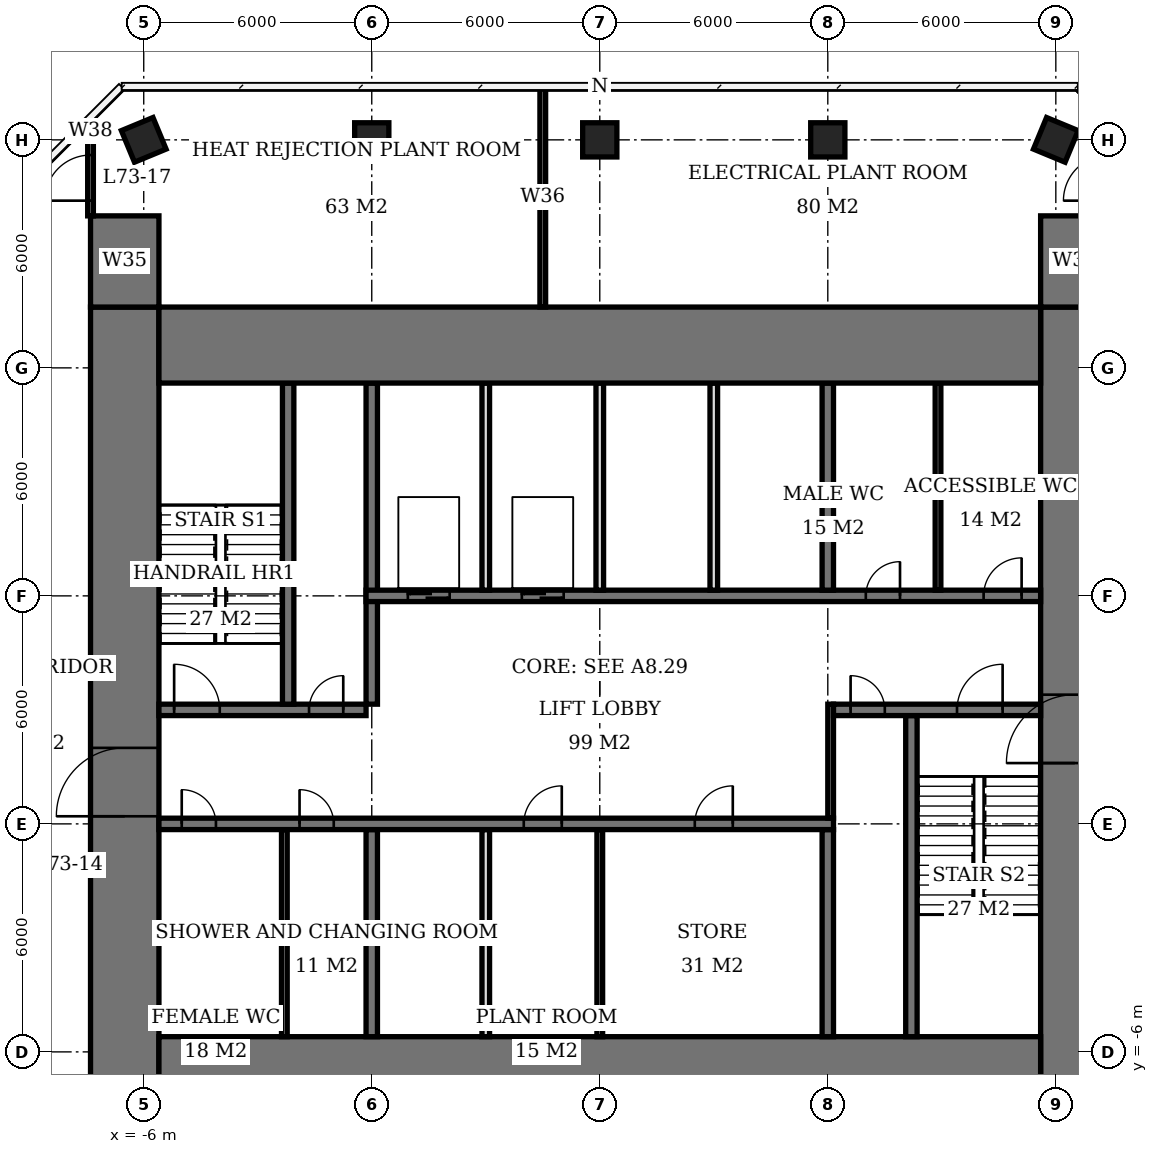
"""IFC4 building model, lengths in metres.
Left out: names, types, materials, properties, quantities, classifications, styles, units other than length and angle.
Written with IfcOpenShell. Run it as: python <this file> out.ifc"""

import sys

from ifc_helpers import new_model, si_unit, direction, frame, frame_2d, origin, origin_2d, place, context, subcontext, project, spatial, rectangle, extrude, element, fill, save


model = new_model("IFC4")
c1 = context("Model", 3, precision=1e-05, world=origin(), true_north=direction((0.0, 1.0)))
c2 = subcontext(c1, "Body", "Model", "MODEL_VIEW")
j1 = project(units=[si_unit("LENGTHUNIT", "METRE"), si_unit("PLANEANGLEUNIT", "RADIAN")], contexts=[c1])
p1 = place(None, origin())
s1 = spatial("IfcSite", under=j1, at=p1, CompositionType="ELEMENT")
p2 = place(p1, origin())
s2 = spatial("IfcBuilding", under=s1, at=p2, CompositionType="ELEMENT")
p3 = place(p2, frame((0.0, 0.0, 295.7)))
s3 = spatial("IfcBuildingStorey", under=s2, at=p3, CompositionType="ELEMENT", Elevation=295.7)
for number, where, z_axis, x_axis in (
    (1, (-6.0, 18.0, 0.0), (0.0, 0.0, 1.0), (0.924, 0.383, 0.0)),
    (2, (0.0, 18.0, 0.0), (0.0, 0.0, 1.0), (1.0, 0.0, 0.0)),
    (3, (6.0, 18.0, 0.0), (0.0, 0.0, 1.0), (1.0, 0.0, 0.0)),
    (4, (12.0, 18.0, 0.0), (0.0, 0.0, 1.0), (1.0, 0.0, 0.0)),
    (5, (18.0, 18.0, 0.0), (0.0, 0.0, 1.0), (0.924, -0.383, 0.0)),
):
    element("IfcColumn", number, at=place(p3, frame(where, z_axis=z_axis, x_axis=x_axis)), inside=s3, PredefinedType="COLUMN", context=c2, shape_type="SweptSolid", body=[
        extrude(rectangle(XDim=0.9, YDim=0.9, at=origin_2d()), origin(), (0.0, 0.0, 1.0), 5.0),
    ])
for number, where, z_axis, x_axis in (
    (6, (-5.6, -6.6, 0.0), (0.0, 0.0, 1.0), (1.0, 0.0, 0.0)),
    (7, (-5.6, 12.6, 0.0), (0.0, 0.0, 1.0), (1.0, 0.0, 0.0)),
):
    element("IfcWall", number, at=place(p3, frame(where, z_axis=z_axis, x_axis=x_axis)), inside=s3, PredefinedType="SHEAR", context=c2, shape_type="SweptSolid", body=[
        extrude(rectangle(XDim=23.2, YDim=2.0, at=frame_2d((11.6, 0.0))), origin(), (0.0, 0.0, 1.0), 5.0),
    ])
p4 = place(p3, frame((-6.5, -7.6, 0.0), z_axis=(0.0, 0.0, 1.0), x_axis=(0.0, 1.0, 0.0)))
e8 = element("IfcWall", 8, at=p4, inside=s3, PredefinedType="SHEAR", context=c2, shape_type="SweptSolid", body=[
    extrude(rectangle(XDim=21.2, YDim=1.8, at=frame_2d((10.6, 0.0))), origin(), (0.0, 0.0, 1.0), 5.0),
])
p5 = place(p4, frame((7.8, 0.0, 0.0)))
e9 = element("IfcOpeningElement", 9, at=p5, cuts=e8, PredefinedType="OPENING", context=c2, shape_type="SweptSolid", body=[
    extrude(rectangle(XDim=1.8, YDim=2.4, at=frame_2d((0.9, 1.2))), frame((0.0, 0.91, 0.0), z_axis=(0.0, -1.0, 0.0), x_axis=(1.0, 0.0, 0.0)), (0.0, 0.0, 1.0), 1.82),
])
p6 = place(p3, frame((18.5, -7.6, 0.0), z_axis=(0.0, 0.0, 1.0), x_axis=(0.0, 1.0, 0.0)))
e10 = element("IfcWall", 10, at=p6, inside=s3, PredefinedType="SHEAR", context=c2, shape_type="SweptSolid", body=[
    extrude(rectangle(XDim=21.2, YDim=1.8, at=frame_2d((10.6, 0.0))), origin(), (0.0, 0.0, 1.0), 5.0),
])
p7 = place(p6, frame((9.2, 0.0, 0.0)))
e11 = element("IfcOpeningElement", 11, at=p7, cuts=e10, PredefinedType="OPENING", context=c2, shape_type="SweptSolid", body=[
    extrude(rectangle(XDim=1.8, YDim=2.4, at=frame_2d((0.9, 1.2))), frame((0.0, 0.91, 0.0), z_axis=(0.0, -1.0, 0.0), x_axis=(1.0, 0.0, 0.0)), (0.0, 0.0, 1.0), 1.82),
])
for number, where, z_axis, x_axis in (
    (12, (-6.5, 13.6, 0.0), (0.0, 0.0, 1.0), (0.0, 1.0, 0.0)),
    (13, (18.5, 13.6, 0.0), (0.0, 0.0, 1.0), (0.0, 1.0, 0.0)),
):
    element("IfcWall", number, at=place(p3, frame(where, z_axis=z_axis, x_axis=x_axis)), inside=s3, PredefinedType="SHEAR", context=c2, shape_type="SweptSolid", body=[
        extrude(rectangle(XDim=2.4, YDim=1.8, at=frame_2d((1.2, 0.0))), origin(), (0.0, 0.0, 1.0), 5.0),
    ])
p8 = place(p3, frame((-5.6, 0.0, 0.0), z_axis=(0.0, 0.0, 1.0), x_axis=(1.0, 0.0, 0.0)))
e14 = element("IfcWall", 14, at=p8, inside=s3, PredefinedType="SHEAR", context=c2, shape_type="SweptSolid", body=[
    extrude(rectangle(XDim=17.75, YDim=0.3, at=frame_2d((8.875, 0.0))), origin(), (0.0, 0.0, 1.0), 5.0),
])
p9 = place(p8, frame((0.6, 0.0, 0.0)))
e15 = element("IfcOpeningElement", 15, at=p9, cuts=e14, PredefinedType="OPENING", context=c2, shape_type="SweptSolid", body=[
    extrude(rectangle(XDim=0.9, YDim=2.1, at=frame_2d((0.45, 1.05))), frame((0.0, 0.16, 0.0), z_axis=(0.0, -1.0, 0.0), x_axis=(1.0, 0.0, 0.0)), (0.0, 0.0, 1.0), 0.32),
])
p10 = place(p8, frame((3.7, 0.0, 0.0)))
e16 = element("IfcOpeningElement", 16, at=p10, cuts=e14, PredefinedType="OPENING", context=c2, shape_type="SweptSolid", body=[
    extrude(rectangle(XDim=0.9, YDim=2.1, at=frame_2d((0.45, 1.05))), frame((0.0, 0.16, 0.0), z_axis=(0.0, -1.0, 0.0), x_axis=(1.0, 0.0, 0.0)), (0.0, 0.0, 1.0), 0.32),
])
p11 = place(p8, frame((9.6, 0.0, 0.0)))
e17 = element("IfcOpeningElement", 17, at=p11, cuts=e14, PredefinedType="OPENING", context=c2, shape_type="SweptSolid", body=[
    extrude(rectangle(XDim=1.0, YDim=2.1, at=frame_2d((0.5, 1.05))), frame((0.0, 0.16, 0.0), z_axis=(0.0, -1.0, 0.0), x_axis=(1.0, 0.0, 0.0)), (0.0, 0.0, 1.0), 0.32),
])
p12 = place(p8, frame((14.1, 0.0, 0.0)))
e18 = element("IfcOpeningElement", 18, at=p12, cuts=e14, PredefinedType="OPENING", context=c2, shape_type="SweptSolid", body=[
    extrude(rectangle(XDim=1.0, YDim=2.1, at=frame_2d((0.5, 1.05))), frame((0.0, 0.16, 0.0), z_axis=(0.0, -1.0, 0.0), x_axis=(1.0, 0.0, 0.0)), (0.0, 0.0, 1.0), 0.32),
])
p13 = place(p3, frame((-5.6, 3.0, 0.0), z_axis=(0.0, 0.0, 1.0), x_axis=(1.0, 0.0, 0.0)))
e19 = element("IfcWall", 19, at=p13, inside=s3, PredefinedType="SHEAR", context=c2, shape_type="SweptSolid", body=[
    extrude(rectangle(XDim=5.45, YDim=0.3, at=frame_2d((2.725, 0.0))), origin(), (0.0, 0.0, 1.0), 5.0),
])
p14 = place(p13, frame((0.4, 0.0, 0.0)))
e20 = element("IfcOpeningElement", 20, at=p14, cuts=e19, PredefinedType="OPENING", context=c2, shape_type="SweptSolid", body=[
    extrude(rectangle(XDim=1.2, YDim=2.1, at=frame_2d((0.6, 1.05))), frame((0.0, 0.16, 0.0), z_axis=(0.0, -1.0, 0.0), x_axis=(1.0, 0.0, 0.0)), (0.0, 0.0, 1.0), 0.32),
])
p15 = place(p13, frame((3.95, 0.0, 0.0)))
e21 = element("IfcOpeningElement", 21, at=p15, cuts=e19, PredefinedType="OPENING", context=c2, shape_type="SweptSolid", body=[
    extrude(rectangle(XDim=0.9, YDim=2.1, at=frame_2d((0.45, 1.05))), frame((0.0, 0.16, 0.0), z_axis=(0.0, -1.0, 0.0), x_axis=(1.0, 0.0, 0.0)), (0.0, 0.0, 1.0), 0.32),
])
p16 = place(p3, frame((12.15, 3.0, 0.0), z_axis=(0.0, 0.0, 1.0), x_axis=(1.0, 0.0, 0.0)))
e22 = element("IfcWall", 22, at=p16, inside=s3, PredefinedType="SHEAR", context=c2, shape_type="SweptSolid", body=[
    extrude(rectangle(XDim=5.45, YDim=0.3, at=frame_2d((2.725, 0.0))), origin(), (0.0, 0.0, 1.0), 5.0),
])
p17 = place(p16, frame((3.25, 0.0, 0.0)))
e23 = element("IfcOpeningElement", 23, at=p17, cuts=e22, PredefinedType="OPENING", context=c2, shape_type="SweptSolid", body=[
    extrude(rectangle(XDim=1.2, YDim=2.1, at=frame_2d((0.6, 1.05))), frame((0.0, 0.16, 0.0), z_axis=(0.0, -1.0, 0.0), x_axis=(1.0, 0.0, 0.0)), (0.0, 0.0, 1.0), 0.32),
])
p18 = place(p16, frame((0.45, 0.0, 0.0)))
e24 = element("IfcOpeningElement", 24, at=p18, cuts=e22, PredefinedType="OPENING", context=c2, shape_type="SweptSolid", body=[
    extrude(rectangle(XDim=0.9, YDim=2.1, at=frame_2d((0.45, 1.05))), frame((0.0, 0.16, 0.0), z_axis=(0.0, -1.0, 0.0), x_axis=(1.0, 0.0, 0.0)), (0.0, 0.0, 1.0), 0.32),
])
p19 = place(p3, frame((-0.15, 6.0, 0.0), z_axis=(0.0, 0.0, 1.0), x_axis=(1.0, 0.0, 0.0)))
e25 = element("IfcWall", 25, at=p19, inside=s3, PredefinedType="SHEAR", context=c2, shape_type="SweptSolid", body=[
    extrude(rectangle(XDim=17.75, YDim=0.3, at=frame_2d((8.875, 0.0))), origin(), (0.0, 0.0, 1.0), 5.0),
])
p20 = place(p19, frame((13.15, 0.0, 0.0)))
e26 = element("IfcOpeningElement", 26, at=p20, cuts=e25, PredefinedType="OPENING", context=c2, shape_type="SweptSolid", body=[
    extrude(rectangle(XDim=0.9, YDim=2.1, at=frame_2d((0.45, 1.05))), frame((0.0, 0.16, 0.0), z_axis=(0.0, -1.0, 0.0), x_axis=(1.0, 0.0, 0.0)), (0.0, 0.0, 1.0), 0.32),
])
p21 = place(p19, frame((16.25, 0.0, 0.0)))
e27 = element("IfcOpeningElement", 27, at=p21, cuts=e25, PredefinedType="OPENING", context=c2, shape_type="SweptSolid", body=[
    extrude(rectangle(XDim=1.0, YDim=2.1, at=frame_2d((0.5, 1.05))), frame((0.0, 0.16, 0.0), z_axis=(0.0, -1.0, 0.0), x_axis=(1.0, 0.0, 0.0)), (0.0, 0.0, 1.0), 0.32),
])
p22 = place(p19, frame((1.1, 0.0, 0.0)))
e28 = element("IfcOpeningElement", 28, at=p22, cuts=e25, PredefinedType="OPENING", context=c2, shape_type="SweptSolid", body=[
    extrude(rectangle(XDim=1.1, YDim=2.1, at=frame_2d((0.55, 1.05))), frame((0.0, 0.16, 0.0), z_axis=(0.0, -1.0, 0.0), x_axis=(1.0, 0.0, 0.0)), (0.0, 0.0, 1.0), 0.32),
])
p23 = place(p19, frame((4.1, 0.0, 0.0)))
e29 = element("IfcOpeningElement", 29, at=p23, cuts=e25, PredefinedType="OPENING", context=c2, shape_type="SweptSolid", body=[
    extrude(rectangle(XDim=1.1, YDim=2.1, at=frame_2d((0.55, 1.05))), frame((0.0, 0.16, 0.0), z_axis=(0.0, -1.0, 0.0), x_axis=(1.0, 0.0, 0.0)), (0.0, 0.0, 1.0), 0.32),
])
p24 = place(p3, frame((0.0, -5.6, 0.0), z_axis=(0.0, 0.0, 1.0), x_axis=(0.0, 1.0, 0.0)))
e30 = element("IfcWall", 30, at=p24, inside=s3, PredefinedType="SHEAR", context=c2, shape_type="SweptSolid", body=[
    extrude(rectangle(XDim=5.45, YDim=0.3, at=frame_2d((2.725, 0.0))), origin(), (0.0, 0.0, 1.0), 5.0),
])
p25 = place(p3, frame((0.0, 3.15, 0.0), z_axis=(0.0, 0.0, 1.0), x_axis=(0.0, 1.0, 0.0)))
e31 = element("IfcWall", 31, at=p25, inside=s3, PredefinedType="SHEAR", context=c2, shape_type="SweptSolid", body=[
    extrude(rectangle(XDim=8.45, YDim=0.3, at=frame_2d((4.225, 0.0))), origin(), (0.0, 0.0, 1.0), 5.0),
])
for number, where, z_axis, x_axis in (
    (32, (12.0, -5.6, 0.0), (0.0, 0.0, 1.0), (0.0, 1.0, 0.0)),
    (33, (12.0, 6.15, 0.0), (0.0, 0.0, 1.0), (0.0, 1.0, 0.0)),
):
    element("IfcWall", number, at=place(p3, frame(where, z_axis=z_axis, x_axis=x_axis)), inside=s3, PredefinedType="SHEAR", context=c2, shape_type="SweptSolid", body=[
        extrude(rectangle(XDim=5.45, YDim=0.3, at=frame_2d((2.725, 0.0))), origin(), (0.0, 0.0, 1.0), 5.0),
    ])
for number, where, z_axis, x_axis in (
    (34, (-2.2, 3.15, 0.0), (0.0, 0.0, 1.0), (0.0, 1.0, 0.0)),
    (35, (14.2, -5.6, 0.0), (0.0, 0.0, 1.0), (0.0, 1.0, 0.0)),
):
    element("IfcWall", number, at=place(p3, frame(where, z_axis=z_axis, x_axis=x_axis)), inside=s3, PredefinedType="SHEAR", context=c2, shape_type="SweptSolid", body=[
        extrude(rectangle(XDim=8.45, YDim=0.3, at=frame_2d((4.225, 0.0))), origin(), (0.0, 0.0, 1.0), 5.0),
    ])
for number, where, z_axis, x_axis in (
    (36, (3.0, 6.15, 0.0), (0.0, 0.0, 1.0), (0.0, 1.0, 0.0)),
    (37, (6.0, 6.15, 0.0), (0.0, 0.0, 1.0), (0.0, 1.0, 0.0)),
    (38, (9.0, 6.15, 0.0), (0.0, 0.0, 1.0), (0.0, 1.0, 0.0)),
    (39, (3.0, -5.6, 0.0), (0.0, 0.0, 1.0), (0.0, 1.0, 0.0)),
):
    element("IfcWall", number, at=place(p3, frame(where, z_axis=z_axis, x_axis=x_axis)), inside=s3, PredefinedType="SOLIDWALL", context=c2, shape_type="SweptSolid", body=[
        extrude(rectangle(XDim=5.45, YDim=0.2, at=frame_2d((2.725, 0.0))), origin(), (0.0, 0.0, 1.0), 5.0),
    ])
for number, where, z_axis, x_axis in (
    (40, (-2.3, -5.6, 0.0), (0.0, 0.0, 1.0), (0.0, 1.0, 0.0)),
    (41, (14.9, 6.15, 0.0), (0.0, 0.0, 1.0), (0.0, 1.0, 0.0)),
):
    element("IfcWall", number, at=place(p3, frame(where, z_axis=z_axis, x_axis=x_axis)), inside=s3, PredefinedType="PLUMBINGWALL", context=c2, shape_type="SweptSolid", body=[
        extrude(rectangle(XDim=5.45, YDim=0.15, at=frame_2d((2.725, 0.0))), origin(), (0.0, 0.0, 1.0), 4.75),
    ])
p26 = place(p3, frame((6.0, -5.6, 0.0), z_axis=(0.0, 0.0, 1.0), x_axis=(0.0, 1.0, 0.0)))
e42 = element("IfcWall", 42, at=p26, inside=s3, PredefinedType="PARTITIONING", context=c2, shape_type="SweptSolid", body=[
    extrude(rectangle(XDim=5.45, YDim=0.15, at=frame_2d((2.725, 0.0))), origin(), (0.0, 0.0, 1.0), 4.75),
])
p27 = place(p3, frame((-7.4, 16.0, 0.0), z_axis=(0.0, 0.0, 1.0), x_axis=(0.0, 1.0, 0.0)))
e43 = element("IfcWall", 43, at=p27, inside=s3, PredefinedType="PARTITIONING", context=c2, shape_type="SweptSolid", body=[
    extrude(rectangle(XDim=2.489, YDim=0.15, at=frame_2d((1.245, 0.0))), origin(), (0.0, 0.0, 1.0), 4.75),
])
p28 = place(p27, frame((0.4, 0.0, 0.0)))
e44 = element("IfcOpeningElement", 44, at=p28, cuts=e43, PredefinedType="OPENING", context=c2, shape_type="SweptSolid", body=[
    extrude(rectangle(XDim=1.2, YDim=2.4, at=frame_2d((0.6, 1.2))), frame((0.0, 0.085, 0.0), z_axis=(0.0, -1.0, 0.0), x_axis=(1.0, 0.0, 0.0)), (0.0, 0.0, 1.0), 0.17),
])
p29 = place(p3, frame((4.5, 13.6, 0.0), z_axis=(0.0, 0.0, 1.0), x_axis=(0.0, 1.0, 0.0)))
e45 = element("IfcWall", 45, at=p29, inside=s3, PredefinedType="PARTITIONING", context=c2, shape_type="SweptSolid", body=[
    extrude(rectangle(XDim=5.8, YDim=0.15, at=frame_2d((2.9, 0.0))), origin(), (0.0, 0.0, 1.0), 4.75),
])
p30 = place(p3, frame((12.075, 0.15, 0.0), z_axis=(0.0, 0.0, 1.0), x_axis=(0.0, 1.0, 0.0)))
e46 = element("IfcWall", 46, at=p30, inside=s3, PredefinedType="PARTITIONING", context=c2, shape_type="SweptSolid", body=[
    extrude(rectangle(XDim=3.0, YDim=0.15, at=frame_2d((1.5, 0.0))), origin(), (0.0, 0.0, 1.0), 4.75),
])
p31 = place(p5, origin())
e47 = element("IfcDoor", 47, at=p31, inside=s3, OperationType="DOUBLE_DOOR_SINGLE_SWING", PredefinedType="DOOR", context=c2, shape_type="SweptSolid", body=[
    extrude(rectangle(XDim=1.8, YDim=2.4, at=frame_2d((0.9, 1.2))), frame((0.0, 0.025, 0.0), z_axis=(0.0, -1.0, 0.0), x_axis=(1.0, 0.0, 0.0)), (0.0, 0.0, 1.0), 0.05),
])
fill(e9, e47)
p32 = place(p7, origin())
e48 = element("IfcDoor", 48, at=p32, inside=s3, OperationType="DOUBLE_DOOR_SINGLE_SWING", PredefinedType="DOOR", context=c2, shape_type="SweptSolid", body=[
    extrude(rectangle(XDim=1.8, YDim=2.4, at=frame_2d((0.9, 1.2))), frame((0.0, 0.025, 0.0), z_axis=(0.0, -1.0, 0.0), x_axis=(1.0, 0.0, 0.0)), (0.0, 0.0, 1.0), 0.05),
])
fill(e11, e48)
p33 = place(p14, origin())
e49 = element("IfcDoor", 49, at=p33, inside=s3, OperationType="SINGLE_SWING_LEFT", PredefinedType="DOOR", context=c2, shape_type="SweptSolid", body=[
    extrude(rectangle(XDim=1.2, YDim=2.1, at=frame_2d((0.6, 1.05))), frame((0.0, 0.025, 0.0), z_axis=(0.0, -1.0, 0.0), x_axis=(1.0, 0.0, 0.0)), (0.0, 0.0, 1.0), 0.05),
])
fill(e20, e49)
p34 = place(p15, origin())
e50 = element("IfcDoor", 50, at=p34, inside=s3, OperationType="SINGLE_SWING_RIGHT", PredefinedType="DOOR", context=c2, shape_type="SweptSolid", body=[
    extrude(rectangle(XDim=0.9, YDim=2.1, at=frame_2d((0.45, 1.05))), frame((0.0, 0.025, 0.0), z_axis=(0.0, -1.0, 0.0), x_axis=(1.0, 0.0, 0.0)), (0.0, 0.0, 1.0), 0.05),
])
fill(e21, e50)
p35 = place(p17, origin())
e51 = element("IfcDoor", 51, at=p35, inside=s3, OperationType="SINGLE_SWING_RIGHT", PredefinedType="DOOR", context=c2, shape_type="SweptSolid", body=[
    extrude(rectangle(XDim=1.2, YDim=2.1, at=frame_2d((0.6, 1.05))), frame((0.0, 0.025, 0.0), z_axis=(0.0, -1.0, 0.0), x_axis=(1.0, 0.0, 0.0)), (0.0, 0.0, 1.0), 0.05),
])
fill(e23, e51)
p36 = place(p18, origin())
e52 = element("IfcDoor", 52, at=p36, inside=s3, OperationType="SINGLE_SWING_LEFT", PredefinedType="DOOR", context=c2, shape_type="SweptSolid", body=[
    extrude(rectangle(XDim=0.9, YDim=2.1, at=frame_2d((0.45, 1.05))), frame((0.0, 0.025, 0.0), z_axis=(0.0, -1.0, 0.0), x_axis=(1.0, 0.0, 0.0)), (0.0, 0.0, 1.0), 0.05),
])
fill(e24, e52)
p37 = place(p9, origin())
e53 = element("IfcDoor", 53, at=p37, inside=s3, OperationType="SINGLE_SWING_LEFT", PredefinedType="DOOR", context=c2, shape_type="SweptSolid", body=[
    extrude(rectangle(XDim=0.9, YDim=2.1, at=frame_2d((0.45, 1.05))), frame((0.0, 0.025, 0.0), z_axis=(0.0, -1.0, 0.0), x_axis=(1.0, 0.0, 0.0)), (0.0, 0.0, 1.0), 0.05),
])
fill(e15, e53)
p38 = place(p10, origin())
e54 = element("IfcDoor", 54, at=p38, inside=s3, OperationType="SINGLE_SWING_LEFT", PredefinedType="DOOR", context=c2, shape_type="SweptSolid", body=[
    extrude(rectangle(XDim=0.9, YDim=2.1, at=frame_2d((0.45, 1.05))), frame((0.0, 0.025, 0.0), z_axis=(0.0, -1.0, 0.0), x_axis=(1.0, 0.0, 0.0)), (0.0, 0.0, 1.0), 0.05),
])
fill(e16, e54)
p39 = place(p20, origin())
e55 = element("IfcDoor", 55, at=p39, inside=s3, OperationType="SINGLE_SWING_RIGHT", PredefinedType="DOOR", context=c2, shape_type="SweptSolid", body=[
    extrude(rectangle(XDim=0.9, YDim=2.1, at=frame_2d((0.45, 1.05))), frame((0.0, 0.025, 0.0), z_axis=(0.0, -1.0, 0.0), x_axis=(1.0, 0.0, 0.0)), (0.0, 0.0, 1.0), 0.05),
])
fill(e26, e55)
p40 = place(p21, origin())
e56 = element("IfcDoor", 56, at=p40, inside=s3, OperationType="SINGLE_SWING_RIGHT", PredefinedType="DOOR", context=c2, shape_type="SweptSolid", body=[
    extrude(rectangle(XDim=1.0, YDim=2.1, at=frame_2d((0.5, 1.05))), frame((0.0, 0.025, 0.0), z_axis=(0.0, -1.0, 0.0), x_axis=(1.0, 0.0, 0.0)), (0.0, 0.0, 1.0), 0.05),
])
fill(e27, e56)
p41 = place(p11, origin())
e57 = element("IfcDoor", 57, at=p41, inside=s3, OperationType="SINGLE_SWING_RIGHT", PredefinedType="DOOR", context=c2, shape_type="SweptSolid", body=[
    extrude(rectangle(XDim=1.0, YDim=2.1, at=frame_2d((0.5, 1.05))), frame((0.0, 0.025, 0.0), z_axis=(0.0, -1.0, 0.0), x_axis=(1.0, 0.0, 0.0)), (0.0, 0.0, 1.0), 0.05),
])
fill(e17, e57)
p42 = place(p12, origin())
e58 = element("IfcDoor", 58, at=p42, inside=s3, OperationType="SINGLE_SWING_RIGHT", PredefinedType="DOOR", context=c2, shape_type="SweptSolid", body=[
    extrude(rectangle(XDim=1.0, YDim=2.1, at=frame_2d((0.5, 1.05))), frame((0.0, 0.025, 0.0), z_axis=(0.0, -1.0, 0.0), x_axis=(1.0, 0.0, 0.0)), (0.0, 0.0, 1.0), 0.05),
])
fill(e18, e58)
p43 = place(p22, origin())
e59 = element("IfcDoor", 59, at=p43, inside=s3, OperationType="DOUBLE_DOOR_SLIDING", PredefinedType="USERDEFINED", context=c2, shape_type="SweptSolid", body=[
    extrude(rectangle(XDim=1.1, YDim=2.1, at=frame_2d((0.55, 1.05))), frame((0.0, 0.025, 0.0), z_axis=(0.0, -1.0, 0.0), x_axis=(1.0, 0.0, 0.0)), (0.0, 0.0, 1.0), 0.05),
])
fill(e28, e59)
p44 = place(p23, origin())
e60 = element("IfcDoor", 60, at=p44, inside=s3, OperationType="DOUBLE_DOOR_SLIDING", PredefinedType="USERDEFINED", context=c2, shape_type="SweptSolid", body=[
    extrude(rectangle(XDim=1.1, YDim=2.1, at=frame_2d((0.55, 1.05))), frame((0.0, 0.025, 0.0), z_axis=(0.0, -1.0, 0.0), x_axis=(1.0, 0.0, 0.0)), (0.0, 0.0, 1.0), 0.05),
])
fill(e29, e60)
p45 = place(p28, origin())
e61 = element("IfcDoor", 61, at=p45, inside=s3, OperationType="SINGLE_SWING_LEFT", PredefinedType="DOOR", context=c2, shape_type="SweptSolid", body=[
    extrude(rectangle(XDim=1.2, YDim=2.4, at=frame_2d((0.6, 1.2))), frame((0.0, 0.025, 0.0), z_axis=(0.0, -1.0, 0.0), x_axis=(1.0, 0.0, 0.0)), (0.0, 0.0, 1.0), 0.05),
])
fill(e44, e61)
save(model, sys.argv[1])
